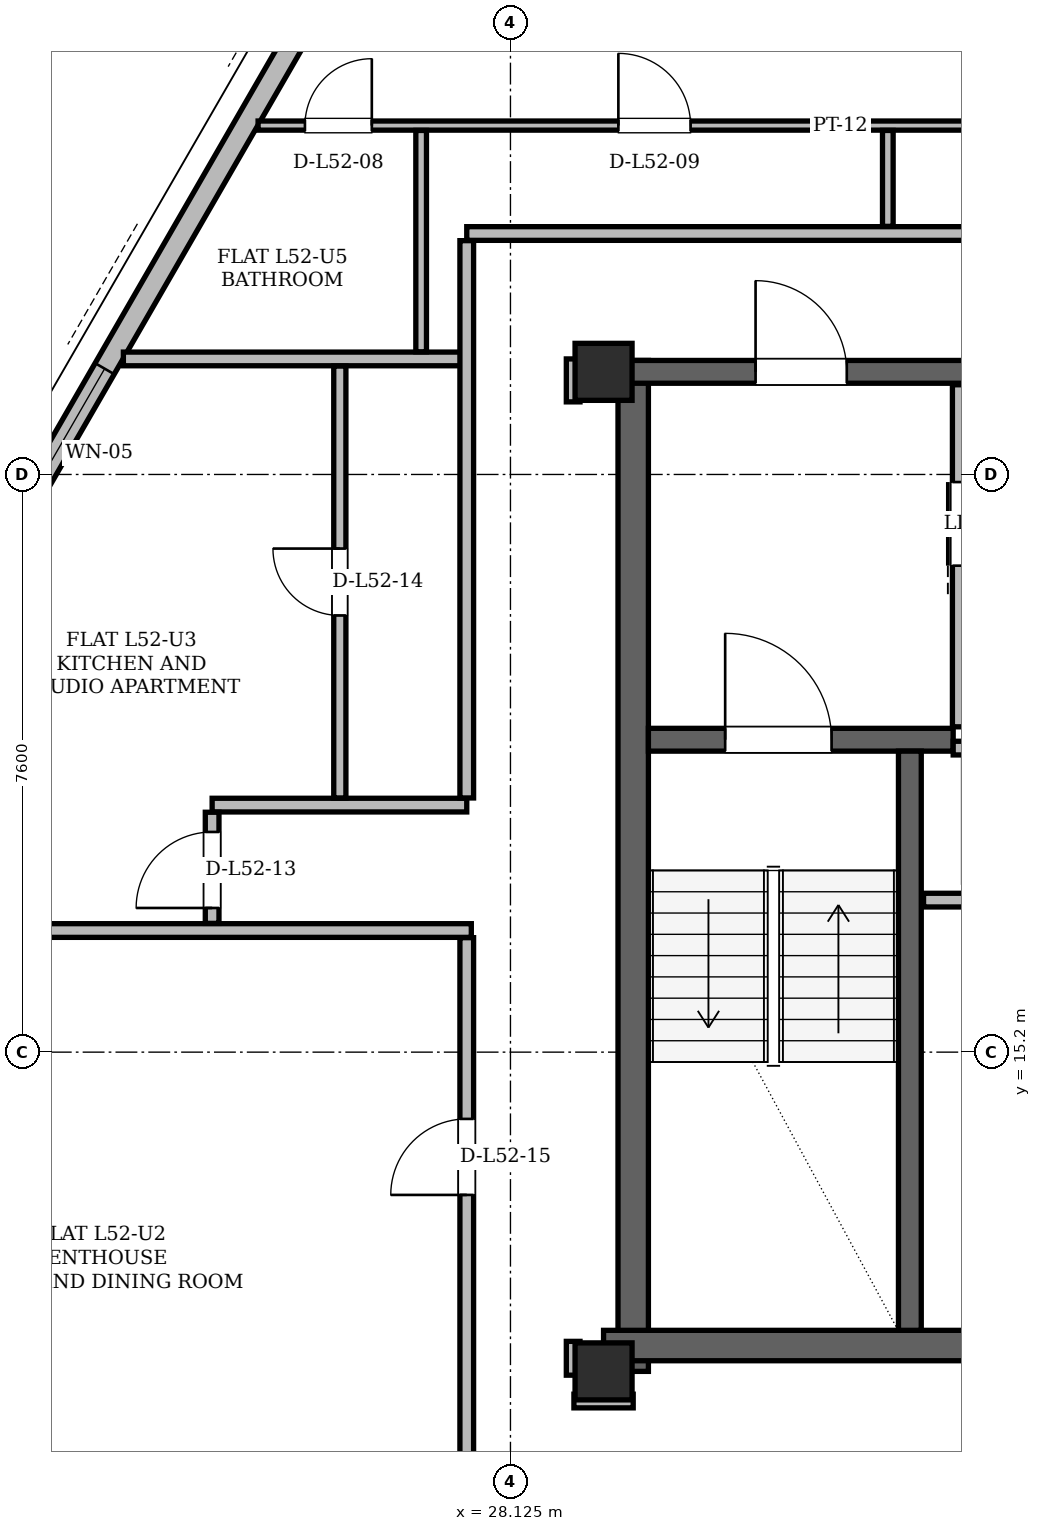
"""IFC4 building model, lengths in metres.
Left out: names, types, materials, properties, quantities, classifications, styles, units other than length and angle.
Written with IfcOpenShell. Run it as: python <this file> out.ifc"""

import sys

from ifc_helpers import new_model, si_unit, direction, frame, frame_2d, origin, origin_2d, place, context, subcontext, project, spatial, rectangle, hollow_rectangle, extrude, element, fill, save


model = new_model("IFC4")
c1 = context("Model", 3, precision=1e-05, world=origin(), true_north=direction((0.0, 1.0)))
c2 = subcontext(c1, "Body", "Model", "MODEL_VIEW")
j1 = project(units=[si_unit("LENGTHUNIT", "METRE"), si_unit("PLANEANGLEUNIT", "RADIAN")], contexts=[c1])
p1 = place(None, origin())
s1 = spatial("IfcSite", under=j1, at=p1, CompositionType="ELEMENT")
p2 = place(p1, origin())
s2 = spatial("IfcBuilding", under=s1, at=p2, CompositionType="ELEMENT")
p3 = place(p2, frame((0.0, 0.0, 197.4)))
s3 = spatial("IfcBuildingStorey", under=s2, at=p3, CompositionType="ELEMENT", Elevation=197.4)
for number, where, z_axis, x_axis in (
    (1, (29.35, 11.0, 0.0), (0.0, 0.0, 1.0), (1.0, 0.0, 0.0)),
    (2, (29.35, 24.15, 0.0), (0.0, 0.0, 1.0), (1.0, 0.0, 0.0)),
):
    element("IfcColumn", number, at=place(p3, frame(where, z_axis=z_axis, x_axis=x_axis)), inside=s3, PredefinedType="COLUMN", context=c2, shape_type="SweptSolid", body=[
        extrude(hollow_rectangle(XDim=0.75, YDim=0.75, WallThickness=0.06, at=origin_2d()), origin(), (0.0, 0.0, 1.0), 3.6),
    ])
p4 = place(p3, frame((29.74, 11.0, 0.0), z_axis=(0.0, 0.0, 1.0), x_axis=(0.0, 1.0, 0.0)))
e3 = element("IfcWall", 3, at=p4, inside=s3, PredefinedType="SHEAR", context=c2, shape_type="SweptSolid", body=[
    extrude(rectangle(XDim=13.3, YDim=0.4, at=frame_2d((6.65, 0.0))), origin(), (0.0, 0.0, 1.0), 3.38),
])
p5 = place(p3, frame((29.35, 11.34, 0.0), z_axis=(0.0, 0.0, 1.0), x_axis=(1.0, 0.0, 0.0)))
e4 = element("IfcWall", 4, at=p5, inside=s3, PredefinedType="SHEAR", context=c2, shape_type="SweptSolid", body=[
    extrude(rectangle(XDim=7.1, YDim=0.4, at=frame_2d((3.55, 0.0))), origin(), (0.0, 0.0, 1.0), 3.38),
])
p6 = place(p3, frame((29.65, 24.15, 0.0), z_axis=(0.0, 0.0, 1.0), x_axis=(1.0, 0.0, 0.0)))
e5 = element("IfcWall", 5, at=p6, inside=s3, PredefinedType="SHEAR", context=c2, shape_type="SweptSolid", body=[
    extrude(rectangle(XDim=15.7, YDim=0.3, at=frame_2d((7.85, 0.0))), origin(), (0.0, 0.0, 1.0), 3.38),
])
p7 = place(p6, frame((1.7, 0.0, 0.0)))
e6 = element("IfcOpeningElement", 6, at=p7, cuts=e5, PredefinedType="OPENING", context=c2, shape_type="SweptSolid", body=[
    extrude(rectangle(XDim=1.2, YDim=2.2, at=frame_2d((0.6, 1.1))), frame((0.0, 0.15, 0.0), z_axis=(0.0, -1.0, 0.0), x_axis=(1.0, 0.0, 0.0)), (0.0, 0.0, 1.0), 0.3),
])
p8 = place(p6, frame((12.8, 0.0, 0.0)))
e7 = element("IfcOpeningElement", 7, at=p8, cuts=e5, PredefinedType="OPENING", context=c2, shape_type="SweptSolid", body=[
    extrude(rectangle(XDim=1.2, YDim=2.2, at=frame_2d((0.6, 1.1))), frame((0.0, 0.15, 0.0), z_axis=(0.0, -1.0, 0.0), x_axis=(1.0, 0.0, 0.0)), (0.0, 0.0, 1.0), 0.3),
])
p9 = place(p6, frame((6.55, 0.0, 0.0)))
e8 = element("IfcOpeningElement", 8, at=p9, cuts=e5, PredefinedType="OPENING", context=c2, shape_type="SweptSolid", body=[
    extrude(rectangle(XDim=0.9, YDim=2.05, at=frame_2d((0.45, 1.025))), frame((0.0, 0.15, 0.0), z_axis=(0.0, -1.0, 0.0), x_axis=(1.0, 0.0, 0.0)), (0.0, 0.0, 1.0), 0.3),
])
p10 = place(p6, frame((8.45, 0.0, 0.0)))
e9 = element("IfcOpeningElement", 9, at=p10, cuts=e5, PredefinedType="OPENING", context=c2, shape_type="SweptSolid", body=[
    extrude(rectangle(XDim=0.9, YDim=2.05, at=frame_2d((0.45, 1.025))), frame((0.0, 0.15, 0.0), z_axis=(0.0, -1.0, 0.0), x_axis=(1.0, 0.0, 0.0)), (0.0, 0.0, 1.0), 0.3),
])
p11 = place(p3, frame((29.94, 19.31, 0.0), z_axis=(0.0, 0.0, 1.0), x_axis=(1.0, 0.0, 0.0)))
e10 = element("IfcWall", 10, at=p11, inside=s3, PredefinedType="SHEAR", context=c2, shape_type="SweptSolid", body=[
    extrude(rectangle(XDim=4.01, YDim=0.3, at=frame_2d((2.005, 0.0))), origin(), (0.0, 0.0, 1.0), 3.38),
])
p12 = place(p11, frame((1.01, 0.0, 0.0)))
e11 = element("IfcOpeningElement", 11, at=p12, cuts=e10, PredefinedType="OPENING", context=c2, shape_type="SweptSolid", body=[
    extrude(rectangle(XDim=1.4, YDim=2.2, at=frame_2d((0.7, 1.1))), frame((0.0, 0.15, 0.0), z_axis=(0.0, -1.0, 0.0), x_axis=(1.0, 0.0, 0.0)), (0.0, 0.0, 1.0), 0.3),
])
p13 = place(p3, frame((33.38, 11.54, 0.0), z_axis=(0.0, 0.0, 1.0), x_axis=(0.0, 1.0, 0.0)))
e12 = element("IfcWall", 12, at=p13, inside=s3, PredefinedType="SHEAR", context=c2, shape_type="SweptSolid", body=[
    extrude(rectangle(XDim=7.62, YDim=0.3, at=frame_2d((3.81, 0.0))), origin(), (0.0, 0.0, 1.0), 3.38),
])
p14 = place(p3, frame((33.766, 43.21, 0.0), z_axis=(0.0, 0.0, 1.0), x_axis=(-0.499998847915, -0.86602606894, 0.0)))
e13 = element("IfcWall", 13, at=p14, inside=s3, PredefinedType="SOLIDWALL", context=c2, shape_type="SweptSolid", body=[
    extrude(rectangle(XDim=36.293, YDim=0.29, at=frame_2d((18.147, 0.0))), origin(), (0.0, 0.0, 1.0), 2.677),
])
p15 = place(p14, frame((8.034, 0.0, 0.0)))
e14 = element("IfcOpeningElement", 14, at=p15, cuts=e13, PredefinedType="OPENING", context=c2, shape_type="SweptSolid", body=[
    extrude(rectangle(XDim=1.5, YDim=2.2, at=frame_2d((0.75, 1.1))), frame((0.0, 0.145, 0.0), z_axis=(0.0, -1.0, 0.0), x_axis=(1.0, 0.0, 0.0)), (0.0, 0.0, 1.0), 0.29),
])
p16 = place(p14, frame((28.214, 0.0, 0.0)))
e15 = element("IfcOpeningElement", 15, at=p16, cuts=e13, PredefinedType="OPENING", context=c2, shape_type="SweptSolid", body=[
    extrude(rectangle(XDim=1.5, YDim=2.2, at=frame_2d((0.75, 1.1))), frame((0.0, 0.145, 0.0), z_axis=(0.0, -1.0, 0.0), x_axis=(1.0, 0.0, 0.0)), (0.0, 0.0, 1.0), 0.29),
])
p17 = place(p14, frame((32.772, 0.0, 0.85)))
e16 = element("IfcOpeningElement", 16, at=p17, cuts=e13, PredefinedType="OPENING", context=c2, shape_type="SweptSolid", body=[
    extrude(rectangle(XDim=2.4, YDim=1.717, at=frame_2d((1.2, 0.858))), frame((0.0, 0.145, 0.0), z_axis=(0.0, -1.0, 0.0), x_axis=(1.0, 0.0, 0.0)), (0.0, 0.0, 1.0), 0.29),
])
p18 = place(p14, frame((21.96, 0.0, 0.85)))
e17 = element("IfcOpeningElement", 17, at=p18, cuts=e13, PredefinedType="OPENING", context=c2, shape_type="SweptSolid", body=[
    extrude(rectangle(XDim=2.0, YDim=1.717, at=frame_2d((1.0, 0.858))), frame((0.0, 0.145, 0.0), z_axis=(0.0, -1.0, 0.0), x_axis=(1.0, 0.0, 0.0)), (0.0, 0.0, 1.0), 0.29),
])
p19 = place(p14, frame((2.382, 0.0, 0.85)))
e18 = element("IfcOpeningElement", 18, at=p19, cuts=e13, PredefinedType="OPENING", context=c2, shape_type="SweptSolid", body=[
    extrude(rectangle(XDim=1.6, YDim=1.7, at=frame_2d((0.8, 0.85))), frame((0.0, 0.145, 0.0), z_axis=(0.0, -1.0, 0.0), x_axis=(1.0, 0.0, 0.0)), (0.0, 0.0, 1.0), 0.29),
])
p20 = place(p14, frame((13.34, 0.0, 0.85)))
e19 = element("IfcOpeningElement", 19, at=p20, cuts=e13, PredefinedType="OPENING", context=c2, shape_type="SweptSolid", body=[
    extrude(rectangle(XDim=3.0, YDim=1.717, at=frame_2d((1.5, 0.858))), frame((0.0, 0.145, 0.0), z_axis=(0.0, -1.0, 0.0), x_axis=(1.0, 0.0, 0.0)), (0.0, 0.0, 1.0), 0.29),
])
p21 = place(p3, frame((34.04, 19.48, 0.0), z_axis=(0.0, 0.0, 1.0), x_axis=(0.0, 1.0, 0.0)))
e20 = element("IfcWall", 20, at=p21, inside=s3, PredefinedType="PARTITIONING", context=c2, shape_type="SweptSolid", body=[
    extrude(rectangle(XDim=4.5, YDim=0.2, at=frame_2d((2.25, 0.0))), origin(), (0.0, 0.0, 1.0), 3.38),
])
p22 = place(p21, frame((2.12, 0.0, 0.0)))
e21 = element("IfcOpeningElement", 21, at=p22, cuts=e20, PredefinedType="OPENING", context=c2, shape_type="SweptSolid", body=[
    extrude(rectangle(XDim=1.1, YDim=2.2, at=frame_2d((0.55, 1.1))), frame((0.0, 0.1, 0.0), z_axis=(0.0, -1.0, 0.0), x_axis=(1.0, 0.0, 0.0)), (0.0, 0.0, 1.0), 0.2),
])
p23 = place(p3, frame((33.95, 19.2, 0.0), z_axis=(0.0, 0.0, 1.0), x_axis=(1.0, 0.0, 0.0)))
e22 = element("IfcWall", 22, at=p23, inside=s3, PredefinedType="PARTITIONING", context=c2, shape_type="SweptSolid", body=[
    extrude(rectangle(XDim=2.27, YDim=0.18, at=frame_2d((1.135, 0.0))), origin(), (0.0, 0.0, 1.0), 3.38),
])
p24 = place(p3, frame((33.56, 17.2, 0.0), z_axis=(0.0, 0.0, 1.0), x_axis=(1.0, 0.0, 0.0)))
e23 = element("IfcWall", 23, at=p24, inside=s3, PredefinedType="PARTITIONING", context=c2, shape_type="SweptSolid", body=[
    extrude(rectangle(XDim=2.66, YDim=0.18, at=frame_2d((1.33, 0.0))), origin(), (0.0, 0.0, 1.0), 3.38),
])
p25 = place(p3, frame((28.96, 10.61, 0.0), z_axis=(0.0, 0.0, 1.0), x_axis=(1.0, 0.0, 0.0)))
e24 = element("IfcWall", 24, at=p25, inside=s3, PredefinedType="PARTITIONING", context=c2, shape_type="SweptSolid", body=[
    extrude(rectangle(XDim=0.78, YDim=0.18, at=frame_2d((0.39, 0.0))), origin(), (0.0, 0.0, 1.0), 3.38),
])
p26 = place(p3, frame((18.756, 16.8, 0.0), z_axis=(0.0, 0.0, 1.0), x_axis=(1.0, 0.0, 0.0)))
e25 = element("IfcWall", 25, at=p26, inside=s3, PredefinedType="PARTITIONING", context=c2, shape_type="SweptSolid", body=[
    extrude(rectangle(XDim=8.854, YDim=0.18, at=frame_2d((4.427, 0.0))), origin(), (0.0, 0.0, 1.0), 3.38),
])
p27 = place(p3, frame((24.2, 18.45, 0.0), z_axis=(0.0, 0.0, 1.0), x_axis=(1.0, 0.0, 0.0)))
e26 = element("IfcWall", 26, at=p27, inside=s3, PredefinedType="PARTITIONING", context=c2, shape_type="SweptSolid", body=[
    extrude(rectangle(XDim=3.35, YDim=0.18, at=frame_2d((1.675, 0.0))), origin(), (0.0, 0.0, 1.0), 3.38),
])
p28 = place(p3, frame((23.032, 24.32, 0.0), z_axis=(0.0, 0.0, 1.0), x_axis=(1.0, 0.0, 0.0)))
e27 = element("IfcWall", 27, at=p28, inside=s3, PredefinedType="PARTITIONING", context=c2, shape_type="SweptSolid", body=[
    extrude(rectangle(XDim=4.578, YDim=0.18, at=frame_2d((2.289, 0.0))), origin(), (0.0, 0.0, 1.0), 3.38),
])
p29 = place(p3, frame((27.55, 25.97, 0.0), z_axis=(0.0, 0.0, 1.0), x_axis=(1.0, 0.0, 0.0)))
e28 = element("IfcWall", 28, at=p29, inside=s3, PredefinedType="PARTITIONING", context=c2, shape_type="SweptSolid", body=[
    extrude(rectangle(XDim=9.15, YDim=0.18, at=frame_2d((4.575, 0.0))), origin(), (0.0, 0.0, 1.0), 2.913),
])
p30 = place(p3, frame((24.805, 27.39, 0.0), z_axis=(0.0, 0.0, 1.0), x_axis=(1.0, 0.0, 0.0)))
e29 = element("IfcWall", 29, at=p30, inside=s3, PredefinedType="PARTITIONING", context=c2, shape_type="SweptSolid", body=[
    extrude(rectangle(XDim=11.945, YDim=0.12, at=frame_2d((5.973, 0.0))), origin(), (0.0, 0.0, 1.0), 2.913),
])
p31 = place(p30, frame((0.616, 0.0, 0.0)))
e30 = element("IfcOpeningElement", 30, at=p31, cuts=e29, PredefinedType="OPENING", context=c2, shape_type="SweptSolid", body=[
    extrude(rectangle(XDim=0.88, YDim=2.08, at=frame_2d((0.44, 1.04))), frame((0.0, 0.06, 0.0), z_axis=(0.0, -1.0, 0.0), x_axis=(1.0, 0.0, 0.0)), (0.0, 0.0, 1.0), 0.12),
])
p32 = place(p30, frame((4.74, 0.0, 0.0)))
e31 = element("IfcOpeningElement", 31, at=p32, cuts=e29, PredefinedType="OPENING", context=c2, shape_type="SweptSolid", body=[
    extrude(rectangle(XDim=0.95, YDim=2.1, at=frame_2d((0.475, 1.05))), frame((0.0, 0.06, 0.0), z_axis=(0.0, -1.0, 0.0), x_axis=(1.0, 0.0, 0.0)), (0.0, 0.0, 1.0), 0.12),
])
p33 = place(p30, frame((9.632, 0.0, 0.0)))
e32 = element("IfcOpeningElement", 32, at=p33, cuts=e29, PredefinedType="OPENING", context=c2, shape_type="SweptSolid", body=[
    extrude(rectangle(XDim=0.95, YDim=2.1, at=frame_2d((0.475, 1.05))), frame((0.0, 0.06, 0.0), z_axis=(0.0, -1.0, 0.0), x_axis=(1.0, 0.0, 0.0)), (0.0, 0.0, 1.0), 0.12),
])
p34 = place(p3, frame((24.2, 16.894, 0.0), z_axis=(0.0, 0.0, 1.0), x_axis=(0.0, 1.0, 0.0)))
e33 = element("IfcWall", 33, at=p34, inside=s3, PredefinedType="PARTITIONING", context=c2, shape_type="SweptSolid", body=[
    extrude(rectangle(XDim=1.462, YDim=0.18, at=frame_2d((0.731, 0.0))), origin(), (0.0, 0.0, 1.0), 3.38),
])
p35 = place(p34, frame((0.203, 0.0, 0.0)))
e34 = element("IfcOpeningElement", 34, at=p35, cuts=e33, PredefinedType="OPENING", context=c2, shape_type="SweptSolid", body=[
    extrude(rectangle(XDim=1.0, YDim=2.18, at=frame_2d((0.5, 1.09))), frame((0.0, 0.09, 0.0), z_axis=(0.0, -1.0, 0.0), x_axis=(1.0, 0.0, 0.0)), (0.0, 0.0, 1.0), 0.18),
])
p36 = place(p3, frame((25.88, 18.544, 0.0), z_axis=(0.0, 0.0, 1.0), x_axis=(0.0, 1.0, 0.0)))
e35 = element("IfcWall", 35, at=p36, inside=s3, PredefinedType="PARTITIONING", context=c2, shape_type="SweptSolid", body=[
    extrude(rectangle(XDim=5.682, YDim=0.16, at=frame_2d((2.841, 0.0))), origin(), (0.0, 0.0, 1.0), 3.38),
])
p37 = place(p36, frame((2.401, 0.0, 0.0)))
e36 = element("IfcOpeningElement", 36, at=p37, cuts=e35, PredefinedType="OPENING", context=c2, shape_type="SweptSolid", body=[
    extrude(rectangle(XDim=0.88, YDim=2.08, at=frame_2d((0.44, 1.04))), frame((0.0, 0.08, 0.0), z_axis=(0.0, -1.0, 0.0), x_axis=(1.0, 0.0, 0.0)), (0.0, 0.0, 1.0), 0.16),
])
p38 = place(p3, frame((26.95, 24.414, 0.0), z_axis=(0.0, 0.0, 1.0), x_axis=(0.0, 1.0, 0.0)))
e37 = element("IfcWall", 37, at=p38, inside=s3, PredefinedType="PARTITIONING", context=c2, shape_type="SweptSolid", body=[
    extrude(rectangle(XDim=2.912, YDim=0.14, at=frame_2d((1.456, 0.0))), origin(), (0.0, 0.0, 1.0), 3.38),
])
p39 = place(p3, frame((27.55, 9.394, 0.0), z_axis=(0.0, 0.0, 1.0), x_axis=(0.0, 1.0, 0.0)))
e38 = element("IfcWall", 38, at=p39, inside=s3, PredefinedType="PARTITIONING", context=c2, shape_type="SweptSolid", body=[
    extrude(rectangle(XDim=7.312, YDim=0.18, at=frame_2d((3.656, 0.0))), origin(), (0.0, 0.0, 1.0), 2.913),
])
p40 = place(p39, frame((3.927, 0.0, 0.0)))
e39 = element("IfcOpeningElement", 39, at=p40, cuts=e38, PredefinedType="OPENING", context=c2, shape_type="SweptSolid", body=[
    extrude(rectangle(XDim=1.0, YDim=2.18, at=frame_2d((0.5, 1.09))), frame((0.0, 0.09, 0.0), z_axis=(0.0, -1.0, 0.0), x_axis=(1.0, 0.0, 0.0)), (0.0, 0.0, 1.0), 0.18),
])
p41 = place(p3, frame((27.55, 18.544, 0.0), z_axis=(0.0, 0.0, 1.0), x_axis=(0.0, 1.0, 0.0)))
e40 = element("IfcWall", 40, at=p41, inside=s3, PredefinedType="PARTITIONING", context=c2, shape_type="SweptSolid", body=[
    extrude(rectangle(XDim=7.332, YDim=0.18, at=frame_2d((3.666, 0.0))), origin(), (0.0, 0.0, 1.0), 3.38),
])
p42 = place(p3, frame((28.95, 10.95, 0.0), z_axis=(0.0, 0.0, 1.0), x_axis=(0.0, 1.0, 0.0)))
e41 = element("IfcWall", 41, at=p42, inside=s3, PredefinedType="PARTITIONING", context=c2, shape_type="SweptSolid", body=[
    extrude(rectangle(XDim=0.445, YDim=0.18, at=frame_2d((0.223, 0.0))), origin(), (0.0, 0.0, 1.0), 2.913),
])
p43 = place(p3, frame((28.95, 23.755, 0.0), z_axis=(0.0, 0.0, 1.0), x_axis=(0.0, 1.0, 0.0)))
e42 = element("IfcWall", 42, at=p43, inside=s3, PredefinedType="PARTITIONING", context=c2, shape_type="SweptSolid", body=[
    extrude(rectangle(XDim=0.565, YDim=0.18, at=frame_2d((0.283, 0.0))), origin(), (0.0, 0.0, 1.0), 3.38),
])
p44 = place(p3, frame((33.09, 26.064, 0.0), z_axis=(0.0, 0.0, 1.0), x_axis=(0.0, 1.0, 0.0)))
e43 = element("IfcWall", 43, at=p44, inside=s3, PredefinedType="PARTITIONING", context=c2, shape_type="SweptSolid", body=[
    extrude(rectangle(XDim=1.262, YDim=0.14, at=frame_2d((0.631, 0.0))), origin(), (0.0, 0.0, 1.0), 3.38),
])
p45 = place(p18, origin())
e44 = element("IfcWindow", 44, at=p45, inside=s3, PartitioningType="SINGLE_PANEL", PredefinedType="WINDOW", context=c2, shape_type="SweptSolid", body=[
    extrude(rectangle(XDim=2.0, YDim=1.717, at=frame_2d((1.0, 0.858))), frame((0.0, 0.03, 0.0), z_axis=(0.0, -1.0, 0.0), x_axis=(1.0, 0.0, 0.0)), (0.0, 0.0, 1.0), 0.06),
])
fill(e17, e44)
p46 = place(p22, origin())
e45 = element("IfcDoor", 45, at=p46, inside=s3, OperationType="SLIDING_TO_LEFT", PredefinedType="DOOR", context=c2, shape_type="SweptSolid", body=[
    extrude(rectangle(XDim=1.1, YDim=2.2, at=frame_2d((0.55, 1.1))), frame((0.0, 0.025, 0.0), z_axis=(0.0, -1.0, 0.0), x_axis=(1.0, 0.0, 0.0)), (0.0, 0.0, 1.0), 0.05),
])
fill(e21, e45)
p47 = place(p12, origin())
e46 = element("IfcDoor", 46, at=p47, inside=s3, OperationType="SINGLE_SWING_LEFT", PredefinedType="DOOR", context=c2, shape_type="SweptSolid", body=[
    extrude(rectangle(XDim=1.4, YDim=2.2, at=frame_2d((0.7, 1.1))), frame((0.0, 0.025, 0.0), z_axis=(0.0, -1.0, 0.0), x_axis=(1.0, 0.0, 0.0)), (0.0, 0.0, 1.0), 0.05),
])
fill(e11, e46)
p48 = place(p7, origin())
e47 = element("IfcDoor", 47, at=p48, inside=s3, OperationType="SINGLE_SWING_LEFT", PredefinedType="DOOR", context=c2, shape_type="SweptSolid", body=[
    extrude(rectangle(XDim=1.2, YDim=2.2, at=frame_2d((0.6, 1.1))), frame((0.0, 0.025, 0.0), z_axis=(0.0, -1.0, 0.0), x_axis=(1.0, 0.0, 0.0)), (0.0, 0.0, 1.0), 0.05),
])
fill(e6, e47)
p49 = place(p31, origin())
e48 = element("IfcDoor", 48, at=p49, inside=s3, OperationType="SINGLE_SWING_RIGHT", PredefinedType="DOOR", context=c2, shape_type="SweptSolid", body=[
    extrude(rectangle(XDim=0.88, YDim=2.08, at=frame_2d((0.44, 1.04))), frame((0.0, 0.025, 0.0), z_axis=(0.0, -1.0, 0.0), x_axis=(1.0, 0.0, 0.0)), (0.0, 0.0, 1.0), 0.05),
])
fill(e30, e48)
p50 = place(p32, origin())
e49 = element("IfcDoor", 49, at=p50, inside=s3, OperationType="SINGLE_SWING_LEFT", PredefinedType="DOOR", context=c2, shape_type="SweptSolid", body=[
    extrude(rectangle(XDim=0.95, YDim=2.1, at=frame_2d((0.475, 1.05))), frame((0.0, 0.025, 0.0), z_axis=(0.0, -1.0, 0.0), x_axis=(1.0, 0.0, 0.0)), (0.0, 0.0, 1.0), 0.05),
])
fill(e31, e49)
p51 = place(p35, origin())
e50 = element("IfcDoor", 50, at=p51, inside=s3, OperationType="SINGLE_SWING_LEFT", PredefinedType="DOOR", context=c2, shape_type="SweptSolid", body=[
    extrude(rectangle(XDim=1.0, YDim=2.18, at=frame_2d((0.5, 1.09))), frame((0.0, 0.025, 0.0), z_axis=(0.0, -1.0, 0.0), x_axis=(1.0, 0.0, 0.0)), (0.0, 0.0, 1.0), 0.05),
])
fill(e34, e50)
p52 = place(p37, origin())
e51 = element("IfcDoor", 51, at=p52, inside=s3, OperationType="SINGLE_SWING_RIGHT", PredefinedType="DOOR", context=c2, shape_type="SweptSolid", body=[
    extrude(rectangle(XDim=0.88, YDim=2.08, at=frame_2d((0.44, 1.04))), frame((0.0, 0.025, 0.0), z_axis=(0.0, -1.0, 0.0), x_axis=(1.0, 0.0, 0.0)), (0.0, 0.0, 1.0), 0.05),
])
fill(e36, e51)
p53 = place(p40, origin())
e52 = element("IfcDoor", 52, at=p53, inside=s3, OperationType="SINGLE_SWING_LEFT", PredefinedType="DOOR", context=c2, shape_type="SweptSolid", body=[
    extrude(rectangle(XDim=1.0, YDim=2.18, at=frame_2d((0.5, 1.09))), frame((0.0, 0.025, 0.0), z_axis=(0.0, -1.0, 0.0), x_axis=(1.0, 0.0, 0.0)), (0.0, 0.0, 1.0), 0.05),
])
fill(e39, e52)
save(model, sys.argv[1])
